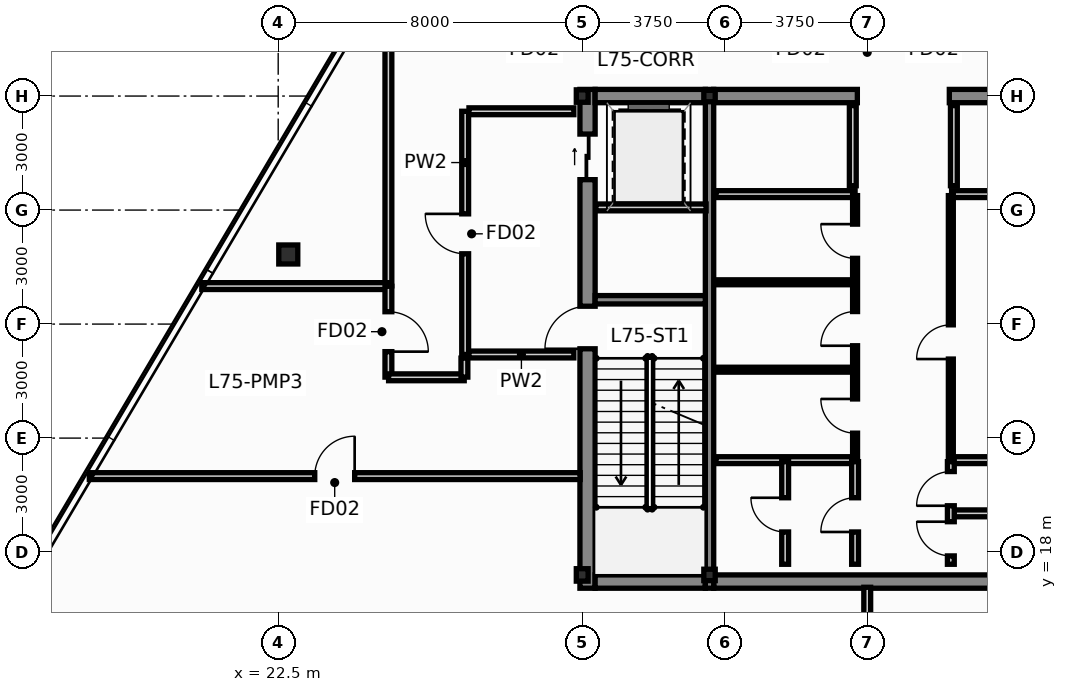
"""IFC4 building model, lengths in metres.
Left out: names, types, materials, properties, quantities, classifications, styles, units other than length and angle.
Written with IfcOpenShell. Run it as: python <this file> out.ifc"""

import sys

from ifc_helpers import new_model, si_unit, direction, frame, frame_2d, origin, origin_2d, place, context, subcontext, project, spatial, rectangle, hollow_rectangle, i_section, extrude, source, transform, mapped, element, fill, save


model = new_model("IFC4")
c1 = context("Model", 3, precision=1e-05, world=origin(), true_north=direction((0.0, 1.0)))
c2 = subcontext(c1, "Body", "Model", "MODEL_VIEW")
j1 = project(units=[si_unit("LENGTHUNIT", "METRE"), si_unit("PLANEANGLEUNIT", "RADIAN")], contexts=[c1])
p1 = place(None, origin())
s1 = spatial("IfcSite", under=j1, at=p1, CompositionType="ELEMENT")
p2 = place(p1, origin())
s2 = spatial("IfcBuilding", under=s1, at=p2, CompositionType="ELEMENT")
p3 = place(p2, frame((0.0, 0.0, 284.6)))
s3 = spatial("IfcBuildingStorey", under=s2, at=p3, CompositionType="ELEMENT", Elevation=284.6)
m1 = source(origin(), c2, "Body", "SweptSolid", [
    extrude(i_section(OverallWidth=0.311, OverallDepth=0.327, WebThickness=0.016, FlangeThickness=0.025, at=origin_2d()), origin(), (0.0, 0.0, 1.0), 5.2),
])
for number, where, z_axis, x_axis in (
    (1, (30.5, 17.4, 0.0), (0.0, 0.0, 1.0), (1.0, 0.0, 0.0)),
    (2, (30.5, 30.0, 0.0), (0.0, 0.0, 1.0), (1.0, 0.0, 0.0)),
):
    element("IfcColumn", number, at=place(p3, frame(where, z_axis=z_axis, x_axis=x_axis)), inside=s3, PredefinedType="COLUMN", context=c2, shape_type="MappedRepresentation", body=[
        mapped(m1, transform((0.0, 0.0, 0.0), scale=1.0)),
    ])
m2 = source(origin(), c2, "Body", "SweptSolid", [
    extrude(hollow_rectangle(XDim=0.3, YDim=0.3, WallThickness=0.012, at=origin_2d()), origin(), (0.0, 0.0, 1.0), 5.2),
])
for number, where, z_axis, x_axis in (
    (3, (33.85, 17.4, 0.0), (0.0, 0.0, 1.0), (1.0, 0.0, 0.0)),
    (4, (33.85, 30.0, 0.0), (0.0, 0.0, 1.0), (1.0, 0.0, 0.0)),
):
    element("IfcColumn", number, at=place(p3, frame(where, z_axis=z_axis, x_axis=x_axis)), inside=s3, PredefinedType="COLUMN", context=c2, shape_type="MappedRepresentation", body=[
        mapped(m2, transform((0.0, 0.0, 0.0), scale=1.0)),
    ])
p4 = place(p3, frame((30.64, 17.05, 0.0), z_axis=(0.0, 0.0, 1.0), x_axis=(0.0, 1.0, 0.0)))
e5 = element("IfcWall", 5, at=p4, inside=s3, PredefinedType="SHEAR", context=c2, shape_type="SweptSolid", body=[
    extrude(rectangle(XDim=13.125, YDim=0.4, at=frame_2d((6.562, 0.0))), origin(), (0.0, 0.0, 1.0), 5.2),
])
p5 = place(p4, frame((6.3, 0.0, 0.0)))
e6 = element("IfcOpeningElement", 6, at=p5, cuts=e5, PredefinedType="OPENING", context=c2, shape_type="SweptSolid", body=[
    extrude(rectangle(XDim=1.12, YDim=2.15, at=frame_2d((0.56, 1.075))), frame((0.0, 0.212, 0.0), z_axis=(0.0, -1.0, 0.0), x_axis=(1.0, 0.0, 0.0)), (0.0, 0.0, 1.0), 0.424),
])
p6 = place(p4, frame((10.75, 0.0, 0.0)))
e7 = element("IfcOpeningElement", 7, at=p6, cuts=e5, PredefinedType="OPENING", context=c2, shape_type="SweptSolid", body=[
    extrude(rectangle(XDim=1.2, YDim=2.2, at=frame_2d((0.6, 1.1))), frame((0.0, 0.212, 0.0), z_axis=(0.0, -1.0, 0.0), x_axis=(1.0, 0.0, 0.0)), (0.0, 0.0, 1.0), 0.424),
])
p7 = place(p3, frame((30.84, 17.225, 0.0), z_axis=(0.0, 0.0, 1.0), x_axis=(1.0, 0.0, 0.0)))
e8 = element("IfcWall", 8, at=p7, inside=s3, PredefinedType="SHEAR", context=c2, shape_type="SweptSolid", body=[
    extrude(rectangle(XDim=2.9, YDim=0.35, at=frame_2d((1.45, 0.0))), origin(), (0.0, 0.0, 1.0), 5.2),
])
p8 = place(p3, frame((33.96, 17.225, 0.0), z_axis=(0.0, 0.0, 1.0), x_axis=(1.0, 0.0, 0.0)))
e9 = element("IfcWall", 9, at=p8, inside=s3, PredefinedType="SHEAR", context=c2, shape_type="SweptSolid", body=[
    extrude(rectangle(XDim=8.08, YDim=0.35, at=frame_2d((4.04, 0.0))), origin(), (0.0, 0.0, 1.0), 5.2),
])
p9 = place(p3, frame((30.84, 30.0, 0.0), z_axis=(0.0, 0.0, 1.0), x_axis=(1.0, 0.0, 0.0)))
e10 = element("IfcWall", 10, at=p9, inside=s3, PredefinedType="SHEAR", context=c2, shape_type="SweptSolid", body=[
    extrude(rectangle(XDim=2.9, YDim=0.35, at=frame_2d((1.45, 0.0))), origin(), (0.0, 0.0, 1.0), 5.2),
])
p10 = place(p3, frame((33.96, 30.0, 0.0), z_axis=(0.0, 0.0, 1.0), x_axis=(1.0, 0.0, 0.0)))
e11 = element("IfcWall", 11, at=p10, inside=s3, PredefinedType="SHEAR", context=c2, shape_type="SweptSolid", body=[
    extrude(rectangle(XDim=3.78, YDim=0.35, at=frame_2d((1.89, 0.0))), origin(), (0.0, 0.0, 1.0), 5.2),
])
p11 = place(p3, frame((40.16, 30.0, 0.0), z_axis=(0.0, 0.0, 1.0), x_axis=(1.0, 0.0, 0.0)))
e12 = element("IfcWall", 12, at=p11, inside=s3, PredefinedType="SHEAR", context=c2, shape_type="SweptSolid", body=[
    extrude(rectangle(XDim=1.88, YDim=0.35, at=frame_2d((0.94, 0.0))), origin(), (0.0, 0.0, 1.0), 5.2),
])
p12 = place(p3, frame((33.85, 17.05, 0.0), z_axis=(0.0, 0.0, 1.0), x_axis=(0.0, 1.0, 0.0)))
e13 = element("IfcWall", 13, at=p12, inside=s3, PredefinedType="SHEAR", context=c2, shape_type="SweptSolid", body=[
    extrude(rectangle(XDim=13.125, YDim=0.22, at=frame_2d((6.562, 0.0))), origin(), (0.0, 0.0, 1.0), 5.2),
])
p13 = place(p3, frame((30.84, 24.64, 0.0), z_axis=(0.0, 0.0, 1.0), x_axis=(1.0, 0.0, 0.0)))
e14 = element("IfcWall", 14, at=p13, inside=s3, PredefinedType="SHEAR", context=c2, shape_type="SweptSolid", body=[
    extrude(rectangle(XDim=2.9, YDim=0.22, at=frame_2d((1.45, 0.0))), origin(), (0.0, 0.0, 1.0), 5.2),
])
m3 = source(origin(), c2, "Body", "SweptSolid", [
    extrude(hollow_rectangle(XDim=0.5, YDim=0.5, WallThickness=0.02, at=origin_2d()), origin(), (0.0, 0.0, 1.0), 5.201),
])
p14 = place(p3, frame((22.765, 25.832, 0.0), z_axis=(0.014927202574, -0.013753680359, 0.999793986229), x_axis=(0.677607449893, 0.735423785208, 0.0)))
e15 = element("IfcColumn", 15, at=p14, inside=s3, PredefinedType="COLUMN", context=c2, shape_type="MappedRepresentation", body=[
    mapped(m3, transform((0.0, 0.0, 0.0), scale=1.0)),
])
p15 = place(p3, frame((34.02, 27.42, 0.0), z_axis=(0.0, 0.0, 1.0), x_axis=(1.0, 0.0, 0.0)))
e16 = element("IfcWall", 16, at=p15, inside=s3, PredefinedType="PARTITIONING", context=c2, shape_type="SweptSolid", body=[
    extrude(rectangle(XDim=3.66, YDim=0.18, at=frame_2d((1.83, 0.0))), origin(), (0.0, 0.0, 1.0), 4.95),
])
p16 = place(p3, frame((40.22, 27.42, 0.0), z_axis=(0.0, 0.0, 1.0), x_axis=(1.0, 0.0, 0.0)))
e17 = element("IfcWall", 17, at=p16, inside=s3, PredefinedType="PARTITIONING", context=c2, shape_type="SweptSolid", body=[
    extrude(rectangle(XDim=1.76, YDim=0.18, at=frame_2d((0.88, 0.0))), origin(), (0.0, 0.0, 1.0), 4.95),
])
for number, where, z_axis, x_axis in (
    (18, (37.62, 27.64, 0.0), (0.0, 0.0, 1.0), (0.0, 1.0, 0.0)),
    (19, (40.28, 27.64, 0.0), (0.0, 0.0, 1.0), (0.0, 1.0, 0.0)),
):
    element("IfcWall", number, at=place(p3, frame(where, z_axis=z_axis, x_axis=x_axis)), inside=s3, PredefinedType="PARTITIONING", context=c2, shape_type="SweptSolid", body=[
        extrude(rectangle(XDim=2.11, YDim=0.18, at=frame_2d((1.055, 0.0))), origin(), (0.0, 0.0, 1.0), 4.95),
    ])
p17 = place(p3, frame((27.42, 23.2, 0.0), z_axis=(0.0, 0.0, 1.0), x_axis=(0.0, 1.0, 0.0)))
e20 = element("IfcWall", 20, at=p17, inside=s3, PredefinedType="PARTITIONING", context=c2, shape_type="SweptSolid", body=[
    extrude(rectangle(XDim=6.4, YDim=0.18, at=frame_2d((3.2, 0.0))), origin(), (0.0, 0.0, 1.0), 4.635),
])
p18 = place(p17, frame((2.65, 0.0, 0.0)))
e21 = element("IfcOpeningElement", 21, at=p18, cuts=e20, PredefinedType="OPENING", context=c2, shape_type="SweptSolid", body=[
    extrude(rectangle(XDim=1.05, YDim=2.15, at=frame_2d((0.525, 1.075))), frame((0.0, 0.102, 0.0), z_axis=(0.0, -1.0, 0.0), x_axis=(1.0, 0.0, 0.0)), (0.0, 0.0, 1.0), 0.204),
])
for number, where, z_axis, x_axis in (
    (22, (27.52, 23.2, 0.0), (0.0, 0.0, 1.0), (1.0, 0.0, 0.0)),
    (23, (27.52, 29.6, 0.0), (0.0, 0.0, 1.0), (1.0, 0.0, 0.0)),
):
    element("IfcWall", number, at=place(p3, frame(where, z_axis=z_axis, x_axis=x_axis)), inside=s3, PredefinedType="PARTITIONING", context=c2, shape_type="SweptSolid", body=[
        extrude(rectangle(XDim=2.76, YDim=0.18, at=frame_2d((1.38, 0.0))), origin(), (0.0, 0.0, 1.0), 4.95),
    ])
p19 = place(p3, frame((30.86, 27.07, 0.0), z_axis=(0.0, 0.0, 1.0), x_axis=(1.0, 0.0, 0.0)))
e24 = element("IfcWall", 24, at=p19, inside=s3, PredefinedType="PARTITIONING", context=c2, shape_type="SweptSolid", body=[
    extrude(rectangle(XDim=2.9, YDim=0.18, at=frame_2d((1.45, 0.0))), origin(), (0.0, 0.0, 1.0), 4.95),
])
p20 = place(p3, frame((34.02, 20.42, 0.0), z_axis=(0.0, 0.0, 1.0), x_axis=(1.0, 0.0, 0.0)))
e25 = element("IfcWall", 25, at=p20, inside=s3, PredefinedType="PARTITIONING", context=c2, shape_type="SweptSolid", body=[
    extrude(rectangle(XDim=3.64, YDim=0.18, at=frame_2d((1.82, 0.0))), origin(), (0.0, 0.0, 1.0), 4.95),
])
p21 = place(p3, frame((40.22, 20.42, 0.0), z_axis=(0.0, 0.0, 1.0), x_axis=(1.0, 0.0, 0.0)))
e26 = element("IfcWall", 26, at=p21, inside=s3, PredefinedType="PARTITIONING", context=c2, shape_type="SweptSolid", body=[
    extrude(rectangle(XDim=1.76, YDim=0.18, at=frame_2d((0.88, 0.0))), origin(), (0.0, 0.0, 1.0), 4.95),
])
for number, where, z_axis, x_axis in (
    (27, (34.02, 22.8, 0.0), (0.0, 0.0, 1.0), (1.0, 0.0, 0.0)),
    (28, (34.02, 25.1, 0.0), (0.0, 0.0, 1.0), (1.0, 0.0, 0.0)),
):
    element("IfcWall", number, at=place(p3, frame(where, z_axis=z_axis, x_axis=x_axis)), inside=s3, PredefinedType="PARTITIONING", context=c2, shape_type="SweptSolid", body=[
        extrude(rectangle(XDim=3.58, YDim=0.13, at=frame_2d((1.79, 0.0))), origin(), (0.0, 0.0, 1.0), 4.95),
    ])
p22 = place(p3, frame((37.68, 20.48, 0.0), z_axis=(0.0, 0.0, 1.0), x_axis=(0.0, 1.0, 0.0)))
e29 = element("IfcWall", 29, at=p22, inside=s3, PredefinedType="PARTITIONING", context=c2, shape_type="SweptSolid", body=[
    extrude(rectangle(XDim=6.9, YDim=0.13, at=frame_2d((3.45, 0.0))), origin(), (0.0, 0.0, 1.0), 4.95),
])
p23 = place(p22, frame((0.65, 0.0, 0.0)))
e30 = element("IfcOpeningElement", 30, at=p23, cuts=e29, PredefinedType="OPENING", context=c2, shape_type="SweptSolid", body=[
    extrude(rectangle(XDim=0.9, YDim=2.1, at=frame_2d((0.45, 1.05))), frame((0.0, 0.077, 0.0), z_axis=(0.0, -1.0, 0.0), x_axis=(1.0, 0.0, 0.0)), (0.0, 0.0, 1.0), 0.154),
])
p24 = place(p22, frame((2.95, 0.0, 0.0)))
e31 = element("IfcOpeningElement", 31, at=p24, cuts=e29, PredefinedType="OPENING", context=c2, shape_type="SweptSolid", body=[
    extrude(rectangle(XDim=0.9, YDim=2.1, at=frame_2d((0.45, 1.05))), frame((0.0, 0.077, 0.0), z_axis=(0.0, -1.0, 0.0), x_axis=(1.0, 0.0, 0.0)), (0.0, 0.0, 1.0), 0.154),
])
p25 = place(p22, frame((5.25, 0.0, 0.0)))
e32 = element("IfcOpeningElement", 32, at=p25, cuts=e29, PredefinedType="OPENING", context=c2, shape_type="SweptSolid", body=[
    extrude(rectangle(XDim=0.9, YDim=2.1, at=frame_2d((0.45, 1.05))), frame((0.0, 0.077, 0.0), z_axis=(0.0, -1.0, 0.0), x_axis=(1.0, 0.0, 0.0)), (0.0, 0.0, 1.0), 0.154),
])
p26 = place(p3, frame((40.2, 20.48, 0.0), z_axis=(0.0, 0.0, 1.0), x_axis=(0.0, 1.0, 0.0)))
e33 = element("IfcWall", 33, at=p26, inside=s3, PredefinedType="PARTITIONING", context=c2, shape_type="SweptSolid", body=[
    extrude(rectangle(XDim=6.9, YDim=0.13, at=frame_2d((3.45, 0.0))), origin(), (0.0, 0.0, 1.0), 4.95),
])
p27 = place(p26, frame((2.6, 0.0, 0.0)))
e34 = element("IfcOpeningElement", 34, at=p27, cuts=e33, PredefinedType="OPENING", context=c2, shape_type="SweptSolid", body=[
    extrude(rectangle(XDim=0.9, YDim=2.1, at=frame_2d((0.45, 1.05))), frame((0.0, 0.077, 0.0), z_axis=(0.0, -1.0, 0.0), x_axis=(1.0, 0.0, 0.0)), (0.0, 0.0, 1.0), 0.154),
])
p28 = place(p3, frame((35.84, 17.68, 0.0), z_axis=(0.0, 0.0, 1.0), x_axis=(0.0, 1.0, 0.0)))
e35 = element("IfcWall", 35, at=p28, inside=s3, PredefinedType="PARTITIONING", context=c2, shape_type="SweptSolid", body=[
    extrude(rectangle(XDim=2.7, YDim=0.18, at=frame_2d((1.35, 0.0))), origin(), (0.0, 0.0, 1.0), 4.95),
])
p29 = place(p28, frame((0.85, 0.0, 0.0)))
e36 = element("IfcOpeningElement", 36, at=p29, cuts=e35, PredefinedType="OPENING", context=c2, shape_type="SweptSolid", body=[
    extrude(rectangle(XDim=0.9, YDim=2.1, at=frame_2d((0.45, 1.05))), frame((0.0, 0.102, 0.0), z_axis=(0.0, -1.0, 0.0), x_axis=(1.0, 0.0, 0.0)), (0.0, 0.0, 1.0), 0.204),
])
p30 = place(p3, frame((37.68, 17.68, 0.0), z_axis=(0.0, 0.0, 1.0), x_axis=(0.0, 1.0, 0.0)))
e37 = element("IfcWall", 37, at=p30, inside=s3, PredefinedType="PARTITIONING", context=c2, shape_type="SweptSolid", body=[
    extrude(rectangle(XDim=2.7, YDim=0.18, at=frame_2d((1.35, 0.0))), origin(), (0.0, 0.0, 1.0), 4.95),
])
p31 = place(p30, frame((0.85, 0.0, 0.0)))
e38 = element("IfcOpeningElement", 38, at=p31, cuts=e37, PredefinedType="OPENING", context=c2, shape_type="SweptSolid", body=[
    extrude(rectangle(XDim=0.9, YDim=2.1, at=frame_2d((0.45, 1.05))), frame((0.0, 0.102, 0.0), z_axis=(0.0, -1.0, 0.0), x_axis=(1.0, 0.0, 0.0)), (0.0, 0.0, 1.0), 0.204),
])
p32 = place(p3, frame((40.28, 19.02, 0.0), z_axis=(0.0, 0.0, 1.0), x_axis=(1.0, 0.0, 0.0)))
e39 = element("IfcWall", 39, at=p32, inside=s3, PredefinedType="PARTITIONING", context=c2, shape_type="SweptSolid", body=[
    extrude(rectangle(XDim=1.7, YDim=0.18, at=frame_2d((0.85, 0.0))), origin(), (0.0, 0.0, 1.0), 4.95),
])
p33 = place(p3, frame((40.2, 17.68, 0.0), z_axis=(0.0, 0.0, 1.0), x_axis=(0.0, 1.0, 0.0)))
e40 = element("IfcWall", 40, at=p33, inside=s3, PredefinedType="PARTITIONING", context=c2, shape_type="SweptSolid", body=[
    extrude(rectangle(XDim=2.7, YDim=0.18, at=frame_2d((1.35, 0.0))), origin(), (0.0, 0.0, 1.0), 4.95),
])
p34 = place(p33, frame((0.22, 0.0, 0.0)))
e41 = element("IfcOpeningElement", 41, at=p34, cuts=e40, PredefinedType="OPENING", context=c2, shape_type="SweptSolid", body=[
    extrude(rectangle(XDim=0.9, YDim=2.1, at=frame_2d((0.45, 1.05))), frame((0.0, 0.102, 0.0), z_axis=(0.0, -1.0, 0.0), x_axis=(1.0, 0.0, 0.0)), (0.0, 0.0, 1.0), 0.204),
])
p35 = place(p33, frame((1.54, 0.0, 0.0)))
e42 = element("IfcOpeningElement", 42, at=p35, cuts=e40, PredefinedType="OPENING", context=c2, shape_type="SweptSolid", body=[
    extrude(rectangle(XDim=0.9, YDim=2.1, at=frame_2d((0.45, 1.05))), frame((0.0, 0.102, 0.0), z_axis=(0.0, -1.0, 0.0), x_axis=(1.0, 0.0, 0.0)), (0.0, 0.0, 1.0), 0.204),
])
p36 = place(p3, frame((17.53, 20.0, 0.0), z_axis=(0.0, 0.0, 1.0), x_axis=(1.0, 0.0, 0.0)))
e43 = element("IfcWall", 43, at=p36, inside=s3, PredefinedType="PARTITIONING", context=c2, shape_type="SweptSolid", body=[
    extrude(rectangle(XDim=12.915, YDim=0.18, at=frame_2d((6.458, 0.0))), origin(), (0.0, 0.0, 1.0), 4.95),
])
p37 = place(p36, frame((5.932, 0.0, 0.0)))
e44 = element("IfcOpeningElement", 44, at=p37, cuts=e43, PredefinedType="OPENING", context=c2, shape_type="SweptSolid", body=[
    extrude(rectangle(XDim=1.05, YDim=2.15, at=frame_2d((0.525, 1.075))), frame((0.0, 0.102, 0.0), z_axis=(0.0, -1.0, 0.0), x_axis=(1.0, 0.0, 0.0)), (0.0, 0.0, 1.0), 0.204),
])
p38 = place(p3, frame((38.0, 8.81, 0.0), z_axis=(0.0, 0.0, 1.0), x_axis=(0.0, 1.0, 0.0)))
e45 = element("IfcWall", 45, at=p38, inside=s3, PredefinedType="PARTITIONING", context=c2, shape_type="SweptSolid", body=[
    extrude(rectangle(XDim=8.265, YDim=0.18, at=frame_2d((4.132, 0.0))), origin(), (0.0, 0.0, 1.0), 4.95),
])
p39 = place(p3, frame((25.4, 25.005, 0.0), z_axis=(0.0, 0.0, 1.0), x_axis=(0.0, 1.0, 0.0)))
e46 = element("IfcWall", 46, at=p39, inside=s3, PredefinedType="PARTITIONING", context=c2, shape_type="SweptSolid", body=[
    extrude(rectangle(XDim=7.09, YDim=0.18, at=frame_2d((3.545, 0.0))), origin(), (0.0, 0.0, 1.0), 4.635),
])
p40 = place(p3, frame((20.49, 25.0, 0.0), z_axis=(0.0, 0.0, 1.0), x_axis=(1.0, 0.0, 0.0)))
e47 = element("IfcWall", 47, at=p40, inside=s3, PredefinedType="PARTITIONING", context=c2, shape_type="SweptSolid", body=[
    extrude(rectangle(XDim=4.905, YDim=0.18, at=frame_2d((2.453, 0.0))), origin(), (0.0, 0.0, 1.0), 4.95),
])
p41 = place(p3, frame((25.4, 24.995, 0.0), z_axis=(0.0, 0.0, 1.0), x_axis=(0.0, -1.0, 0.0)))
e48 = element("IfcWall", 48, at=p41, inside=s3, PredefinedType="PARTITIONING", context=c2, shape_type="SweptSolid", body=[
    extrude(rectangle(XDim=2.39, YDim=0.18, at=frame_2d((1.195, 0.0))), origin(), (0.0, 0.0, 1.0), 4.635),
])
p42 = place(p41, frame((0.67, 0.0, 0.0)))
e49 = element("IfcOpeningElement", 49, at=p42, cuts=e48, PredefinedType="OPENING", context=c2, shape_type="SweptSolid", body=[
    extrude(rectangle(XDim=1.05, YDim=2.15, at=frame_2d((0.525, 1.075))), frame((0.0, 0.102, 0.0), z_axis=(0.0, -1.0, 0.0), x_axis=(1.0, 0.0, 0.0)), (0.0, 0.0, 1.0), 0.204),
])
p43 = place(p3, frame((25.405, 22.6, 0.0), z_axis=(0.0, 0.0, 1.0), x_axis=(1.0, 0.0, 0.0)))
e50 = element("IfcWall", 50, at=p43, inside=s3, PredefinedType="PARTITIONING", context=c2, shape_type="SweptSolid", body=[
    extrude(rectangle(XDim=1.99, YDim=0.18, at=frame_2d((0.995, 0.0))), origin(), (0.0, 0.0, 1.0), 4.95),
])
p44 = place(p3, frame((27.4, 22.605, 0.0), z_axis=(0.0, 0.0, 1.0), x_axis=(0.0, 1.0, 0.0)))
e51 = element("IfcWall", 51, at=p44, inside=s3, PredefinedType="PARTITIONING", context=c2, shape_type="SweptSolid", body=[
    extrude(rectangle(XDim=0.5, YDim=0.18, at=frame_2d((0.25, 0.0))), origin(), (0.0, 0.0, 1.0), 4.635),
])
p45 = place(p5, origin())
e52 = element("IfcDoor", 52, at=p45, inside=s3, OperationType="SINGLE_SWING_LEFT", PredefinedType="DOOR", context=c2, shape_type="SweptSolid", body=[
    extrude(rectangle(XDim=1.12, YDim=2.15, at=frame_2d((0.56, 1.075))), frame((0.0, 0.025, 0.0), z_axis=(0.0, -1.0, 0.0), x_axis=(1.0, 0.0, 0.0)), (0.0, 0.0, 1.0), 0.05),
])
fill(e6, e52)
p46 = place(p6, origin())
e53 = element("IfcDoor", 53, at=p46, inside=s3, OperationType="SLIDING_TO_LEFT", PredefinedType="DOOR", context=c2, shape_type="SweptSolid", body=[
    extrude(rectangle(XDim=1.2, YDim=2.2, at=frame_2d((0.6, 1.1))), frame((0.0, 0.025, 0.0), z_axis=(0.0, -1.0, 0.0), x_axis=(1.0, 0.0, 0.0)), (0.0, 0.0, 1.0), 0.05),
])
fill(e7, e53)
p47 = place(p18, origin())
e54 = element("IfcDoor", 54, at=p47, inside=s3, OperationType="SINGLE_SWING_RIGHT", PredefinedType="DOOR", context=c2, shape_type="SweptSolid", body=[
    extrude(rectangle(XDim=1.05, YDim=2.15, at=frame_2d((0.525, 1.075))), frame((0.0, 0.025, 0.0), z_axis=(0.0, -1.0, 0.0), x_axis=(1.0, 0.0, 0.0)), (0.0, 0.0, 1.0), 0.05),
])
fill(e21, e54)
p48 = place(p23, origin())
e55 = element("IfcDoor", 55, at=p48, inside=s3, OperationType="SINGLE_SWING_RIGHT", PredefinedType="DOOR", context=c2, shape_type="SweptSolid", body=[
    extrude(rectangle(XDim=0.9, YDim=2.1, at=frame_2d((0.45, 1.05))), frame((0.0, 0.025, 0.0), z_axis=(0.0, -1.0, 0.0), x_axis=(1.0, 0.0, 0.0)), (0.0, 0.0, 1.0), 0.05),
])
fill(e30, e55)
p49 = place(p24, origin())
e56 = element("IfcDoor", 56, at=p49, inside=s3, OperationType="SINGLE_SWING_LEFT", PredefinedType="DOOR", context=c2, shape_type="SweptSolid", body=[
    extrude(rectangle(XDim=0.9, YDim=2.1, at=frame_2d((0.45, 1.05))), frame((0.0, 0.025, 0.0), z_axis=(0.0, -1.0, 0.0), x_axis=(1.0, 0.0, 0.0)), (0.0, 0.0, 1.0), 0.05),
])
fill(e31, e56)
p50 = place(p25, origin())
e57 = element("IfcDoor", 57, at=p50, inside=s3, OperationType="SINGLE_SWING_RIGHT", PredefinedType="DOOR", context=c2, shape_type="SweptSolid", body=[
    extrude(rectangle(XDim=0.9, YDim=2.1, at=frame_2d((0.45, 1.05))), frame((0.0, 0.025, 0.0), z_axis=(0.0, -1.0, 0.0), x_axis=(1.0, 0.0, 0.0)), (0.0, 0.0, 1.0), 0.05),
])
fill(e32, e57)
p51 = place(p27, origin())
e58 = element("IfcDoor", 58, at=p51, inside=s3, OperationType="SINGLE_SWING_LEFT", PredefinedType="DOOR", context=c2, shape_type="SweptSolid", body=[
    extrude(rectangle(XDim=0.9, YDim=2.1, at=frame_2d((0.45, 1.05))), frame((0.0, 0.025, 0.0), z_axis=(0.0, -1.0, 0.0), x_axis=(1.0, 0.0, 0.0)), (0.0, 0.0, 1.0), 0.05),
])
fill(e34, e58)
p52 = place(p29, origin())
e59 = element("IfcDoor", 59, at=p52, inside=s3, OperationType="SINGLE_SWING_RIGHT", PredefinedType="DOOR", context=c2, shape_type="SweptSolid", body=[
    extrude(rectangle(XDim=0.9, YDim=2.1, at=frame_2d((0.45, 1.05))), frame((0.0, 0.025, 0.0), z_axis=(0.0, -1.0, 0.0), x_axis=(1.0, 0.0, 0.0)), (0.0, 0.0, 1.0), 0.05),
])
fill(e36, e59)
p53 = place(p31, origin())
e60 = element("IfcDoor", 60, at=p53, inside=s3, OperationType="SINGLE_SWING_LEFT", PredefinedType="DOOR", context=c2, shape_type="SweptSolid", body=[
    extrude(rectangle(XDim=0.9, YDim=2.1, at=frame_2d((0.45, 1.05))), frame((0.0, 0.025, 0.0), z_axis=(0.0, -1.0, 0.0), x_axis=(1.0, 0.0, 0.0)), (0.0, 0.0, 1.0), 0.05),
])
fill(e38, e60)
p54 = place(p34, origin())
e61 = element("IfcDoor", 61, at=p54, inside=s3, OperationType="SINGLE_SWING_RIGHT", PredefinedType="DOOR", context=c2, shape_type="SweptSolid", body=[
    extrude(rectangle(XDim=0.9, YDim=2.1, at=frame_2d((0.45, 1.05))), frame((0.0, 0.025, 0.0), z_axis=(0.0, -1.0, 0.0), x_axis=(1.0, 0.0, 0.0)), (0.0, 0.0, 1.0), 0.05),
])
fill(e41, e61)
p55 = place(p35, origin())
e62 = element("IfcDoor", 62, at=p55, inside=s3, OperationType="SINGLE_SWING_LEFT", PredefinedType="DOOR", context=c2, shape_type="SweptSolid", body=[
    extrude(rectangle(XDim=0.9, YDim=2.1, at=frame_2d((0.45, 1.05))), frame((0.0, 0.025, 0.0), z_axis=(0.0, -1.0, 0.0), x_axis=(1.0, 0.0, 0.0)), (0.0, 0.0, 1.0), 0.05),
])
fill(e42, e62)
p56 = place(p37, origin())
e63 = element("IfcDoor", 63, at=p56, inside=s3, OperationType="SINGLE_SWING_RIGHT", PredefinedType="DOOR", context=c2, shape_type="SweptSolid", body=[
    extrude(rectangle(XDim=1.05, YDim=2.15, at=frame_2d((0.525, 1.075))), frame((0.0, 0.025, 0.0), z_axis=(0.0, -1.0, 0.0), x_axis=(1.0, 0.0, 0.0)), (0.0, 0.0, 1.0), 0.05),
])
fill(e44, e63)
p57 = place(p42, origin())
e64 = element("IfcDoor", 64, at=p57, inside=s3, OperationType="SINGLE_SWING_RIGHT", PredefinedType="DOOR", context=c2, shape_type="SweptSolid", body=[
    extrude(rectangle(XDim=1.05, YDim=2.15, at=frame_2d((0.525, 1.075))), frame((0.0, 0.025, 0.0), z_axis=(0.0, -1.0, 0.0), x_axis=(1.0, 0.0, 0.0)), (0.0, 0.0, 1.0), 0.05),
])
fill(e49, e64)
save(model, sys.argv[1])
